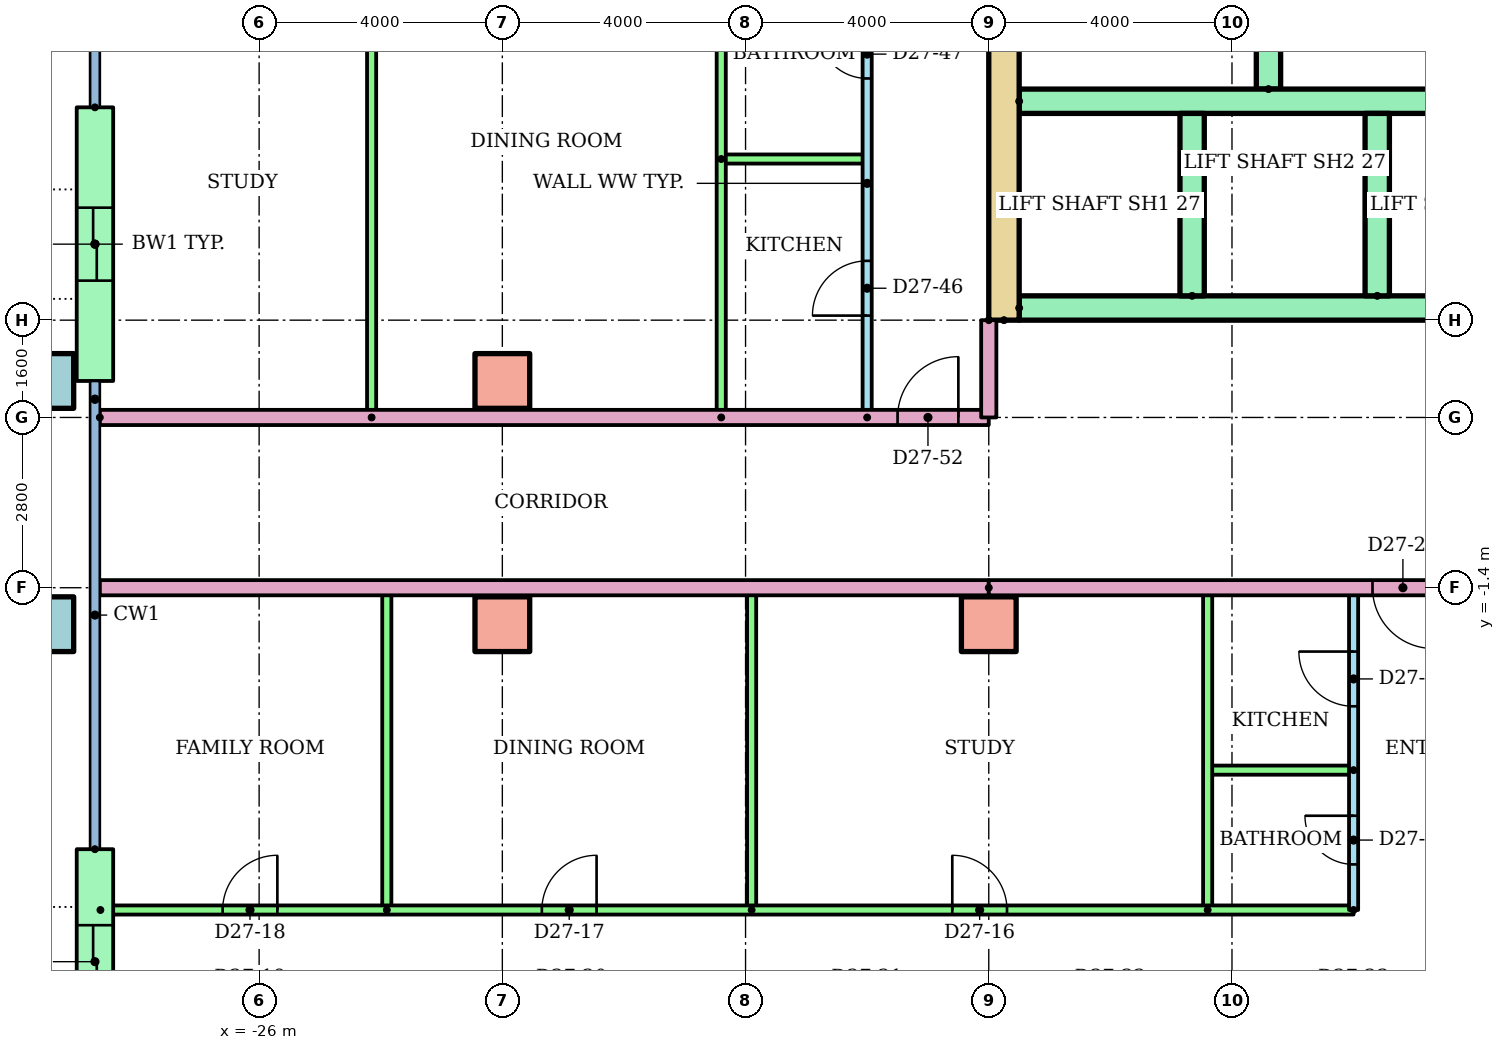
"""IFC4 building model, lengths in metres.
Left out: names, types, materials, properties, quantities, classifications, styles, units other than length and angle.
Written with IfcOpenShell. Run it as: python <this file> out.ifc"""

import sys

from ifc_helpers import new_model, si_unit, direction, frame, frame_2d, origin, origin_2d, place, context, subcontext, project, spatial, rectangle, hollow_rectangle, extrude, element, fill, save


model = new_model("IFC4")
c1 = context("Model", 3, precision=1e-05, world=origin(), true_north=direction((0.0, 1.0)))
c2 = subcontext(c1, "Body", "Model", "MODEL_VIEW")
j1 = project(units=[si_unit("LENGTHUNIT", "METRE"), si_unit("PLANEANGLEUNIT", "RADIAN")], contexts=[c1])
p1 = place(None, origin())
s1 = spatial("IfcSite", under=j1, at=p1, CompositionType="ELEMENT")
p2 = place(p1, origin())
s2 = spatial("IfcBuilding", under=s1, at=p2, CompositionType="ELEMENT")
p3 = place(p2, frame((0.0, 0.0, 103.1)))
s3 = spatial("IfcBuildingStorey", under=s2, at=p3, CompositionType="ELEMENT", Elevation=103.1)
p4 = place(p3, frame((-29.5, -2.0, 0.0)))
e1 = element("IfcColumn", 1, at=p4, inside=s3, PredefinedType="COLUMN", context=c2, shape_type="SweptSolid", body=[
    extrude(hollow_rectangle(XDim=0.9, YDim=0.9, WallThickness=0.045, at=origin_2d()), origin(), (0.0, 0.0, 1.0), 3.2),
])
for number, where in (
    (2, (-22.0, -2.0, 0.0)),
    (3, (-14.0, -2.0, 0.0)),
):
    element("IfcColumn", number, at=place(p3, frame(where)), inside=s3, PredefinedType="COLUMN", context=c2, shape_type="SweptSolid", body=[
        extrude(rectangle(XDim=0.9, YDim=0.9, at=origin_2d()), origin(), (0.0, 0.0, 1.0), 3.2),
    ])
p5 = place(p3, frame((-29.5, 2.0, 0.0)))
e4 = element("IfcColumn", 4, at=p5, inside=s3, PredefinedType="COLUMN", context=c2, shape_type="SweptSolid", body=[
    extrude(hollow_rectangle(XDim=0.9, YDim=0.9, WallThickness=0.045, at=origin_2d()), origin(), (0.0, 0.0, 1.0), 3.2),
])
p6 = place(p3, frame((-22.0, 2.0, 0.0)))
e5 = element("IfcColumn", 5, at=p6, inside=s3, PredefinedType="COLUMN", context=c2, shape_type="SweptSolid", body=[
    extrude(rectangle(XDim=0.9, YDim=0.9, at=origin_2d()), origin(), (0.0, 0.0, 1.0), 3.2),
])
p7 = place(p3, frame((-28.7, 6.5, 0.0), z_axis=(0.0, 0.0, 1.0), x_axis=(0.0, -1.0, 0.0)))
e6 = element("IfcWall", 6, at=p7, inside=s3, PredefinedType="STANDARD", context=c2, shape_type="SweptSolid", body=[
    extrude(rectangle(XDim=4.5, YDim=0.6, at=frame_2d((2.25, 0.0))), origin(), (0.0, 0.0, 1.0), 2.8),
])
p8 = place(p7, frame((1.65, 0.0, 0.0)))
e7 = element("IfcOpeningElement", 7, at=p8, cuts=e6, PredefinedType="OPENING", context=c2, shape_type="SweptSolid", body=[
    extrude(rectangle(XDim=1.2, YDim=2.1, at=frame_2d((0.6, 1.05))), frame((0.0, 0.31, 0.0), z_axis=(0.0, -1.0, 0.0), x_axis=(1.0, 0.0, 0.0)), (0.0, 0.0, 1.0), 0.62),
])
p9 = place(p3, frame((-28.7, -5.7, 0.0), z_axis=(0.0, 0.0, 1.0), x_axis=(0.0, -1.0, 0.0)))
e8 = element("IfcWall", 8, at=p9, inside=s3, PredefinedType="STANDARD", context=c2, shape_type="SweptSolid", body=[
    extrude(rectangle(XDim=3.7, YDim=0.6, at=frame_2d((1.85, 0.0))), origin(), (0.0, 0.0, 1.0), 2.8),
])
p10 = place(p9, frame((1.25, 0.0, 0.0)))
e9 = element("IfcOpeningElement", 9, at=p10, cuts=e8, PredefinedType="OPENING", context=c2, shape_type="SweptSolid", body=[
    extrude(rectangle(XDim=1.2, YDim=2.1, at=frame_2d((0.6, 1.05))), frame((0.0, 0.31, 0.0), z_axis=(0.0, -1.0, 0.0), x_axis=(1.0, 0.0, 0.0)), (0.0, 0.0, 1.0), 0.62),
])
p11 = place(p3, frame((-13.75, 3.0, 0.0), z_axis=(0.0, 0.0, 1.0), x_axis=(0.0, 1.0, 0.0)))
e10 = element("IfcWall", 10, at=p11, inside=s3, PredefinedType="SHEAR", context=c2, shape_type="SweptSolid", body=[
    extrude(rectangle(XDim=17.0, YDim=0.5, at=frame_2d((8.5, 0.0))), origin(), (0.0, 0.0, 1.0), 2.8),
])
p12 = place(p3, frame((-9.4, 6.8, 0.0), z_axis=(0.0, 0.0, 1.0), x_axis=(0.0, 1.0, 0.0)))
e11 = element("IfcWall", 11, at=p12, inside=s3, PredefinedType="SHEAR", context=c2, shape_type="SweptSolid", body=[
    extrude(rectangle(XDim=12.7, YDim=0.4, at=frame_2d((6.35, 0.0))), origin(), (0.0, 0.0, 1.0), 2.8),
])
p13 = place(p12, frame((1.15, 0.0, 0.0)))
e12 = element("IfcOpeningElement", 12, at=p13, cuts=e11, PredefinedType="OPENING", context=c2, shape_type="SweptSolid", body=[
    extrude(rectangle(XDim=1.0, YDim=2.1, at=frame_2d((0.5, 1.05))), frame((0.0, 0.21, 0.0), z_axis=(0.0, -1.0, 0.0), x_axis=(1.0, 0.0, 0.0)), (0.0, 0.0, 1.0), 0.42),
])
p14 = place(p12, frame((7.925, 0.0, 0.0)))
e13 = element("IfcOpeningElement", 13, at=p14, cuts=e11, PredefinedType="OPENING", context=c2, shape_type="SweptSolid", body=[
    extrude(rectangle(XDim=1.0, YDim=2.1, at=frame_2d((0.5, 1.05))), frame((0.0, 0.21, 0.0), z_axis=(0.0, -1.0, 0.0), x_axis=(1.0, 0.0, 0.0)), (0.0, 0.0, 1.0), 0.42),
])
p15 = place(p3, frame((-13.5, 3.2, 0.0)))
e14 = element("IfcWall", 14, at=p15, inside=s3, PredefinedType="SHEAR", context=c2, shape_type="SweptSolid", body=[
    extrude(rectangle(XDim=27.0, YDim=0.4, at=frame_2d((13.5, 0.0))), origin(), (0.0, 0.0, 1.0), 2.8),
])
p16 = place(p15, frame((6.861, 0.0, 0.0)))
e15 = element("IfcOpeningElement", 15, at=p16, cuts=e14, PredefinedType="OPENING", context=c2, shape_type="SweptSolid", body=[
    extrude(rectangle(XDim=1.1, YDim=2.1, at=frame_2d((0.55, 1.05))), frame((0.0, 0.21, 0.0), z_axis=(0.0, -1.0, 0.0), x_axis=(1.0, 0.0, 0.0)), (0.0, 0.0, 1.0), 0.42),
])
p17 = place(p15, frame((9.906, 0.0, 0.0)))
e16 = element("IfcOpeningElement", 16, at=p17, cuts=e14, PredefinedType="OPENING", context=c2, shape_type="SweptSolid", body=[
    extrude(rectangle(XDim=1.1, YDim=2.1, at=frame_2d((0.55, 1.05))), frame((0.0, 0.21, 0.0), z_axis=(0.0, -1.0, 0.0), x_axis=(1.0, 0.0, 0.0)), (0.0, 0.0, 1.0), 0.42),
])
p18 = place(p15, frame((15.994, 0.0, 0.0)))
e17 = element("IfcOpeningElement", 17, at=p18, cuts=e14, PredefinedType="OPENING", context=c2, shape_type="SweptSolid", body=[
    extrude(rectangle(XDim=1.1, YDim=2.1, at=frame_2d((0.55, 1.05))), frame((0.0, 0.21, 0.0), z_axis=(0.0, -1.0, 0.0), x_axis=(1.0, 0.0, 0.0)), (0.0, 0.0, 1.0), 0.42),
])
p19 = place(p15, frame((19.039, 0.0, 0.0)))
e18 = element("IfcOpeningElement", 18, at=p19, cuts=e14, PredefinedType="OPENING", context=c2, shape_type="SweptSolid", body=[
    extrude(rectangle(XDim=1.1, YDim=2.1, at=frame_2d((0.55, 1.05))), frame((0.0, 0.21, 0.0), z_axis=(0.0, -1.0, 0.0), x_axis=(1.0, 0.0, 0.0)), (0.0, 0.0, 1.0), 0.42),
])
p20 = place(p15, frame((12.6, 0.0, 0.0)))
e19 = element("IfcOpeningElement", 19, at=p20, cuts=e14, PredefinedType="OPENING", context=c2, shape_type="SweptSolid", body=[
    extrude(rectangle(XDim=1.8, YDim=2.1, at=frame_2d((0.9, 1.05))), frame((0.0, 0.21, 0.0), z_axis=(0.0, -1.0, 0.0), x_axis=(1.0, 0.0, 0.0)), (0.0, 0.0, 1.0), 0.42),
])
p21 = place(p3, frame((-13.5, 6.6, 0.0)))
e20 = element("IfcWall", 20, at=p21, inside=s3, PredefinedType="SHEAR", context=c2, shape_type="SweptSolid", body=[
    extrude(rectangle(XDim=11.978, YDim=0.4, at=frame_2d((5.989, 0.0))), origin(), (0.0, 0.0, 1.0), 2.8),
])
for number, where, z_axis, x_axis in (
    (21, (-10.656, 3.4, 0.0), (0.0, 0.0, 1.0), (0.0, 1.0, 0.0)),
    (22, (-7.611, 3.4, 0.0), (0.0, 0.0, 1.0), (0.0, 1.0, 0.0)),
):
    element("IfcWall", number, at=place(p3, frame(where, z_axis=z_axis, x_axis=x_axis)), inside=s3, PredefinedType="SHEAR", context=c2, shape_type="SweptSolid", body=[
        extrude(rectangle(XDim=3.0, YDim=0.4, at=frame_2d((1.5, 0.0))), origin(), (0.0, 0.0, 1.0), 2.8),
    ])
p22 = place(p3, frame((-8.0, -6.7, 0.0), z_axis=(0.0, 0.0, 1.0), x_axis=(0.0, 1.0, 0.0)))
e23 = element("IfcWall", 23, at=p22, inside=s3, PredefinedType="PARTITIONING", context=c2, shape_type="SweptSolid", body=[
    extrude(rectangle(XDim=5.3, YDim=0.15, at=frame_2d((2.65, 0.0))), origin(), (0.0, 0.0, 1.0), 2.4),
])
p23 = place(p22, frame((3.35, 0.0, 0.0)))
e24 = element("IfcOpeningElement", 24, at=p23, cuts=e23, PredefinedType="OPENING", context=c2, shape_type="SweptSolid", body=[
    extrude(rectangle(XDim=0.9, YDim=2.1, at=frame_2d((0.45, 1.05))), frame((0.0, 0.085, 0.0), z_axis=(0.0, -1.0, 0.0), x_axis=(1.0, 0.0, 0.0)), (0.0, 0.0, 1.0), 0.17),
])
p24 = place(p22, frame((0.75, 0.0, 0.0)))
e25 = element("IfcOpeningElement", 25, at=p24, cuts=e23, PredefinedType="OPENING", context=c2, shape_type="SweptSolid", body=[
    extrude(rectangle(XDim=0.8, YDim=2.1, at=frame_2d((0.4, 1.05))), frame((0.0, 0.085, 0.0), z_axis=(0.0, -1.0, 0.0), x_axis=(1.0, 0.0, 0.0)), (0.0, 0.0, 1.0), 0.17),
])
p25 = place(p3, frame((-8.0, -4.4, 0.0), z_axis=(0.0, 0.0, 1.0), x_axis=(-1.0, 0.0, 0.0)))
e26 = element("IfcWall", 26, at=p25, inside=s3, PredefinedType="PARTITIONING", context=c2, shape_type="SweptSolid", body=[
    extrude(rectangle(XDim=2.4, YDim=0.15, at=frame_2d((1.2, 0.0))), origin(), (0.0, 0.0, 1.0), 2.4),
])
for number, where, z_axis, x_axis in (
    (27, (-10.4, -6.7, 0.0), (0.0, 0.0, 1.0), (0.0, 1.0, 0.0)),
    (28, (-17.9, -6.7, 0.0), (0.0, 0.0, 1.0), (0.0, 1.0, 0.0)),
    (29, (-23.9, -6.7, 0.0), (0.0, 0.0, 1.0), (0.0, 1.0, 0.0)),
):
    element("IfcWall", number, at=place(p3, frame(where, z_axis=z_axis, x_axis=x_axis)), inside=s3, PredefinedType="PARTITIONING", context=c2, shape_type="SweptSolid", body=[
        extrude(rectangle(XDim=5.3, YDim=0.15, at=frame_2d((2.65, 0.0))), origin(), (0.0, 0.0, 1.0), 2.4),
    ])
p26 = place(p3, frame((-28.61, -6.7, 0.0)))
e30 = element("IfcWall", 30, at=p26, inside=s3, PredefinedType="PARTITIONING", context=c2, shape_type="SweptSolid", body=[
    extrude(rectangle(XDim=20.61, YDim=0.15, at=frame_2d((10.305, 0.0))), origin(), (0.0, 0.0, 1.0), 2.4),
])
p27 = place(p26, frame((14.01, 0.0, 0.0)))
e31 = element("IfcOpeningElement", 31, at=p27, cuts=e30, PredefinedType="OPENING", context=c2, shape_type="SweptSolid", body=[
    extrude(rectangle(XDim=0.9, YDim=2.1, at=frame_2d((0.45, 1.05))), frame((0.0, 0.085, 0.0), z_axis=(0.0, -1.0, 0.0), x_axis=(1.0, 0.0, 0.0)), (0.0, 0.0, 1.0), 0.17),
])
p28 = place(p26, frame((7.26, 0.0, 0.0)))
e32 = element("IfcOpeningElement", 32, at=p28, cuts=e30, PredefinedType="OPENING", context=c2, shape_type="SweptSolid", body=[
    extrude(rectangle(XDim=0.9, YDim=2.1, at=frame_2d((0.45, 1.05))), frame((0.0, 0.085, 0.0), z_axis=(0.0, -1.0, 0.0), x_axis=(1.0, 0.0, 0.0)), (0.0, 0.0, 1.0), 0.17),
])
p29 = place(p26, frame((2.01, 0.0, 0.0)))
e33 = element("IfcOpeningElement", 33, at=p29, cuts=e30, PredefinedType="OPENING", context=c2, shape_type="SweptSolid", body=[
    extrude(rectangle(XDim=0.9, YDim=2.1, at=frame_2d((0.45, 1.05))), frame((0.0, 0.085, 0.0), z_axis=(0.0, -1.0, 0.0), x_axis=(1.0, 0.0, 0.0)), (0.0, 0.0, 1.0), 0.17),
])
p30 = place(p3, frame((-14.0, -1.4, 0.0), z_axis=(0.0, 0.0, 1.0), x_axis=(-1.0, 0.0, 0.0)))
e34 = element("IfcWall", 34, at=p30, inside=s3, PredefinedType="PARTITIONING", context=c2, shape_type="SweptSolid", body=[
    extrude(rectangle(XDim=14.62, YDim=0.25, at=frame_2d((7.31, 0.0))), origin(), (0.0, 0.0, 1.0), 2.4),
])
p31 = place(p3, frame((-16.0, 1.4, 0.0), z_axis=(0.0, 0.0, 1.0), x_axis=(0.0, 1.0, 0.0)))
e35 = element("IfcWall", 35, at=p31, inside=s3, PredefinedType="PARTITIONING", context=c2, shape_type="SweptSolid", body=[
    extrude(rectangle(XDim=7.7, YDim=0.15, at=frame_2d((3.85, 0.0))), origin(), (0.0, 0.0, 1.0), 2.4),
])
p32 = place(p31, frame((1.675, 0.0, 0.0)))
e36 = element("IfcOpeningElement", 36, at=p32, cuts=e35, PredefinedType="OPENING", context=c2, shape_type="SweptSolid", body=[
    extrude(rectangle(XDim=0.9, YDim=2.1, at=frame_2d((0.45, 1.05))), frame((0.0, 0.085, 0.0), z_axis=(0.0, -1.0, 0.0), x_axis=(1.0, 0.0, 0.0)), (0.0, 0.0, 1.0), 0.17),
])
p33 = place(p31, frame((5.575, 0.0, 0.0)))
e37 = element("IfcOpeningElement", 37, at=p33, cuts=e35, PredefinedType="OPENING", context=c2, shape_type="SweptSolid", body=[
    extrude(rectangle(XDim=0.8, YDim=2.1, at=frame_2d((0.4, 1.05))), frame((0.0, 0.085, 0.0), z_axis=(0.0, -1.0, 0.0), x_axis=(1.0, 0.0, 0.0)), (0.0, 0.0, 1.0), 0.17),
])
p34 = place(p3, frame((-18.4, 5.65, 0.0)))
e38 = element("IfcWall", 38, at=p34, inside=s3, PredefinedType="PARTITIONING", context=c2, shape_type="SweptSolid", body=[
    extrude(rectangle(XDim=2.4, YDim=0.15, at=frame_2d((1.2, 0.0))), origin(), (0.0, 0.0, 1.0), 2.4),
])
for number, where, z_axis, x_axis in (
    (39, (-18.4, 1.4, 0.0), (0.0, 0.0, 1.0), (0.0, 1.0, 0.0)),
    (40, (-24.15, 1.4, 0.0), (0.0, 0.0, 1.0), (0.0, 1.0, 0.0)),
):
    element("IfcWall", number, at=place(p3, frame(where, z_axis=z_axis, x_axis=x_axis)), inside=s3, PredefinedType="PARTITIONING", context=c2, shape_type="SweptSolid", body=[
        extrude(rectangle(XDim=7.7, YDim=0.15, at=frame_2d((3.85, 0.0))), origin(), (0.0, 0.0, 1.0), 2.4),
    ])
p35 = place(p3, frame((-28.62, 1.4, 0.0)))
e41 = element("IfcWall", 41, at=p35, inside=s3, PredefinedType="PARTITIONING", context=c2, shape_type="SweptSolid", body=[
    extrude(rectangle(XDim=14.62, YDim=0.25, at=frame_2d((7.31, 0.0))), origin(), (0.0, 0.0, 1.0), 2.4),
])
p36 = place(p35, frame((13.12, 0.0, 0.0)))
e42 = element("IfcOpeningElement", 42, at=p36, cuts=e41, PredefinedType="OPENING", context=c2, shape_type="SweptSolid", body=[
    extrude(rectangle(XDim=1.0, YDim=2.1, at=frame_2d((0.5, 1.05))), frame((0.0, 0.135, 0.0), z_axis=(0.0, -1.0, 0.0), x_axis=(1.0, 0.0, 0.0)), (0.0, 0.0, 1.0), 0.27),
])
p37 = place(p3, frame((14.0, -1.4, 0.0), z_axis=(0.0, 0.0, 1.0), x_axis=(-1.0, 0.0, 0.0)))
e43 = element("IfcWall", 43, at=p37, inside=s3, PredefinedType="PARTITIONING", context=c2, shape_type="SweptSolid", body=[
    extrude(rectangle(XDim=28.0, YDim=0.25, at=frame_2d((14.0, 0.0))), origin(), (0.0, 0.0, 1.0), 2.4),
])
p38 = place(p37, frame((20.689, 0.0, 0.0)))
e44 = element("IfcOpeningElement", 44, at=p38, cuts=e43, PredefinedType="OPENING", context=c2, shape_type="SweptSolid", body=[
    extrude(rectangle(XDim=1.0, YDim=2.1, at=frame_2d((0.5, 1.05))), frame((0.0, 0.135, 0.0), z_axis=(0.0, -1.0, 0.0), x_axis=(1.0, 0.0, 0.0)), (0.0, 0.0, 1.0), 0.27),
])
p39 = place(p37, frame((18.311, 0.0, 0.0)))
e45 = element("IfcOpeningElement", 45, at=p39, cuts=e43, PredefinedType="OPENING", context=c2, shape_type="SweptSolid", body=[
    extrude(rectangle(XDim=1.0, YDim=2.1, at=frame_2d((0.5, 1.05))), frame((0.0, 0.135, 0.0), z_axis=(0.0, -1.0, 0.0), x_axis=(1.0, 0.0, 0.0)), (0.0, 0.0, 1.0), 0.27),
])
p40 = place(p3, frame((-14.0, 3.0, 0.0), z_axis=(0.0, 0.0, 1.0), x_axis=(0.0, -1.0, 0.0)))
e46 = element("IfcWall", 46, at=p40, inside=s3, PredefinedType="PARTITIONING", context=c2, shape_type="SweptSolid", body=[
    extrude(rectangle(XDim=1.6, YDim=0.25, at=frame_2d((0.8, 0.0))), origin(), (0.0, 0.0, 1.0), 2.4),
])
p41 = place(p23, origin())
e47 = element("IfcDoor", 47, at=p41, inside=s3, OperationType="SINGLE_SWING_RIGHT", PredefinedType="DOOR", context=c2, shape_type="SweptSolid", body=[
    extrude(rectangle(XDim=0.9, YDim=2.1, at=frame_2d((0.45, 1.05))), frame((0.0, 0.025, 0.0), z_axis=(0.0, -1.0, 0.0), x_axis=(1.0, 0.0, 0.0)), (0.0, 0.0, 1.0), 0.05),
])
fill(e24, e47)
p42 = place(p24, origin())
e48 = element("IfcDoor", 48, at=p42, inside=s3, OperationType="SINGLE_SWING_RIGHT", PredefinedType="DOOR", context=c2, shape_type="SweptSolid", body=[
    extrude(rectangle(XDim=0.8, YDim=2.1, at=frame_2d((0.4, 1.05))), frame((0.0, 0.025, 0.0), z_axis=(0.0, -1.0, 0.0), x_axis=(1.0, 0.0, 0.0)), (0.0, 0.0, 1.0), 0.05),
])
fill(e25, e48)
p43 = place(p27, origin())
e49 = element("IfcDoor", 49, at=p43, inside=s3, OperationType="SINGLE_SWING_LEFT", PredefinedType="DOOR", context=c2, shape_type="SweptSolid", body=[
    extrude(rectangle(XDim=0.9, YDim=2.1, at=frame_2d((0.45, 1.05))), frame((0.0, 0.025, 0.0), z_axis=(0.0, -1.0, 0.0), x_axis=(1.0, 0.0, 0.0)), (0.0, 0.0, 1.0), 0.05),
])
fill(e31, e49)
p44 = place(p28, origin())
e50 = element("IfcDoor", 50, at=p44, inside=s3, OperationType="SINGLE_SWING_RIGHT", PredefinedType="DOOR", context=c2, shape_type="SweptSolid", body=[
    extrude(rectangle(XDim=0.9, YDim=2.1, at=frame_2d((0.45, 1.05))), frame((0.0, 0.025, 0.0), z_axis=(0.0, -1.0, 0.0), x_axis=(1.0, 0.0, 0.0)), (0.0, 0.0, 1.0), 0.05),
])
fill(e32, e50)
p45 = place(p29, origin())
e51 = element("IfcDoor", 51, at=p45, inside=s3, OperationType="SINGLE_SWING_RIGHT", PredefinedType="DOOR", context=c2, shape_type="SweptSolid", body=[
    extrude(rectangle(XDim=0.9, YDim=2.1, at=frame_2d((0.45, 1.05))), frame((0.0, 0.025, 0.0), z_axis=(0.0, -1.0, 0.0), x_axis=(1.0, 0.0, 0.0)), (0.0, 0.0, 1.0), 0.05),
])
fill(e33, e51)
p46 = place(p38, origin())
e52 = element("IfcDoor", 52, at=p46, inside=s3, OperationType="SINGLE_SWING_LEFT", PredefinedType="DOOR", context=c2, shape_type="SweptSolid", body=[
    extrude(rectangle(XDim=1.0, YDim=2.1, at=frame_2d((0.5, 1.05))), frame((0.0, 0.025, 0.0), z_axis=(0.0, -1.0, 0.0), x_axis=(1.0, 0.0, 0.0)), (0.0, 0.0, 1.0), 0.05),
])
fill(e44, e52)
p47 = place(p32, origin())
e53 = element("IfcDoor", 53, at=p47, inside=s3, OperationType="SINGLE_SWING_LEFT", PredefinedType="DOOR", context=c2, shape_type="SweptSolid", body=[
    extrude(rectangle(XDim=0.9, YDim=2.1, at=frame_2d((0.45, 1.05))), frame((0.0, 0.025, 0.0), z_axis=(0.0, -1.0, 0.0), x_axis=(1.0, 0.0, 0.0)), (0.0, 0.0, 1.0), 0.05),
])
fill(e36, e53)
p48 = place(p33, origin())
e54 = element("IfcDoor", 54, at=p48, inside=s3, OperationType="SINGLE_SWING_RIGHT", PredefinedType="DOOR", context=c2, shape_type="SweptSolid", body=[
    extrude(rectangle(XDim=0.8, YDim=2.1, at=frame_2d((0.4, 1.05))), frame((0.0, 0.025, 0.0), z_axis=(0.0, -1.0, 0.0), x_axis=(1.0, 0.0, 0.0)), (0.0, 0.0, 1.0), 0.05),
])
fill(e37, e54)
p49 = place(p36, origin())
e55 = element("IfcDoor", 55, at=p49, inside=s3, OperationType="SINGLE_SWING_RIGHT", PredefinedType="DOOR", context=c2, shape_type="SweptSolid", body=[
    extrude(rectangle(XDim=1.0, YDim=2.1, at=frame_2d((0.5, 1.05))), frame((0.0, 0.025, 0.0), z_axis=(0.0, -1.0, 0.0), x_axis=(1.0, 0.0, 0.0)), (0.0, 0.0, 1.0), 0.05),
])
fill(e42, e55)
p50 = place(p8, origin())
e56 = element("IfcDoor", 56, at=p50, inside=s3, OperationType="SLIDING_TO_LEFT", PredefinedType="DOOR", context=c2, shape_type="SweptSolid", body=[
    extrude(rectangle(XDim=1.2, YDim=2.1, at=frame_2d((0.6, 1.05))), frame((0.0, 0.025, 0.0), z_axis=(0.0, -1.0, 0.0), x_axis=(1.0, 0.0, 0.0)), (0.0, 0.0, 1.0), 0.05),
])
fill(e7, e56)
p51 = place(p10, origin())
e57 = element("IfcDoor", 57, at=p51, inside=s3, OperationType="SLIDING_TO_LEFT", PredefinedType="DOOR", context=c2, shape_type="SweptSolid", body=[
    extrude(rectangle(XDim=1.2, YDim=2.1, at=frame_2d((0.6, 1.05))), frame((0.0, 0.025, 0.0), z_axis=(0.0, -1.0, 0.0), x_axis=(1.0, 0.0, 0.0)), (0.0, 0.0, 1.0), 0.05),
])
fill(e9, e57)
save(model, sys.argv[1])
